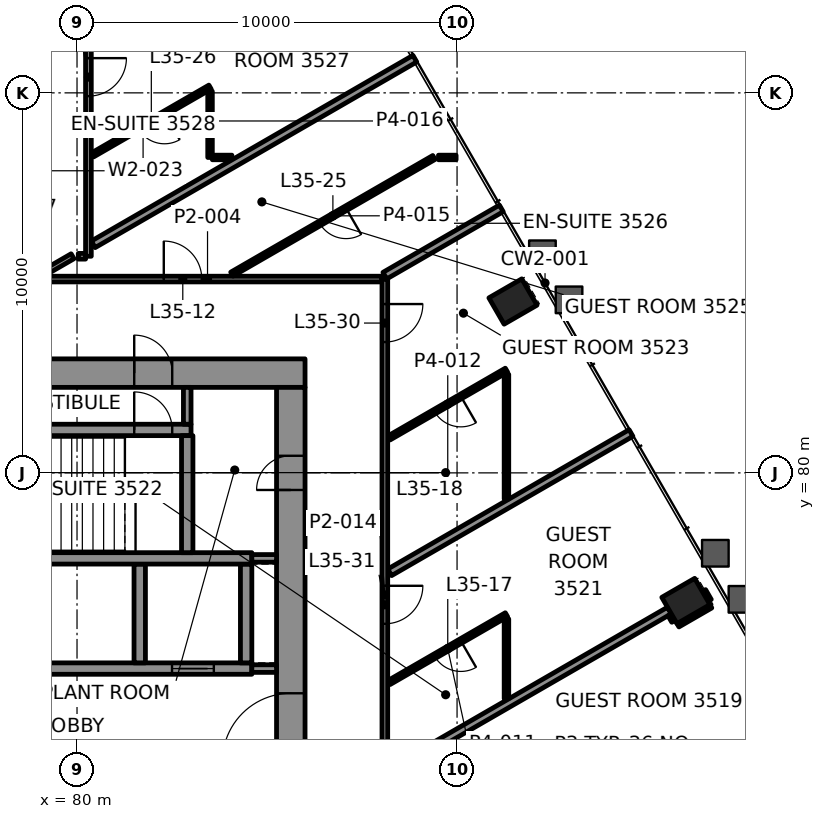
"""IFC4 building model, lengths in metres.
Left out: names, types, materials, properties, quantities, classifications, styles, units other than length and angle.
Written with IfcOpenShell. Run it as: python <this file> out.ifc"""

import sys

from ifc_helpers import new_model, si_unit, direction, frame, frame_2d, origin, origin_2d, place, context, subcontext, project, spatial, rectangle, hollow_rectangle, extrude, element, fill, save


model = new_model("IFC4")
c1 = context("Model", 3, precision=1e-05, world=origin(), true_north=direction((0.0, 1.0)))
c2 = subcontext(c1, "Body", "Model", "MODEL_VIEW")
j1 = project(units=[si_unit("LENGTHUNIT", "METRE"), si_unit("PLANEANGLEUNIT", "RADIAN")], contexts=[c1])
p1 = place(None, origin())
s1 = spatial("IfcSite", under=j1, at=p1, CompositionType="ELEMENT")
p2 = place(p1, origin())
s2 = spatial("IfcBuilding", under=s1, at=p2, CompositionType="ELEMENT")
p3 = place(p2, frame((0.0, 0.0, 155.8)))
s3 = spatial("IfcBuildingStorey", under=s2, at=p3, CompositionType="ELEMENT", Elevation=155.8)
for number, where, z_axis, x_axis in (
    (1, (96.021, 76.628, -0.0), (0.0, 0.0, 1.0), (-0.5, 0.866, 0.0)),
    (2, (91.47, 84.509, -0.0), (0.0, 0.0, 1.0), (-0.5, 0.866, 0.0)),
):
    element("IfcColumn", number, at=place(p3, frame(where, z_axis=z_axis, x_axis=x_axis)), inside=s3, PredefinedType="COLUMN", context=c2, shape_type="SweptSolid", body=[
        extrude(hollow_rectangle(XDim=0.8, YDim=1.0, WallThickness=0.05, at=origin_2d()), origin(), (0.0, 0.0, 1.0), 3.9),
    ])
p4 = place(p3, frame((64.0, 82.625, 0.0), z_axis=(0.0, 0.0, 1.0), x_axis=(1.0, 0.0, 0.0)))
e3 = element("IfcWall", 3, at=p4, inside=s3, PredefinedType="SHEAR", context=c2, shape_type="SweptSolid", body=[
    extrude(rectangle(XDim=22.0, YDim=0.75, at=frame_2d((11.0, 0.0))), origin(), (0.0, 0.0, 1.0), 3.7),
])
p5 = place(p4, frame((3.695, 0.0, 0.0)))
e4 = element("IfcOpeningElement", 4, at=p5, cuts=e3, PredefinedType="OPENING", context=c2, shape_type="SweptSolid", body=[
    extrude(rectangle(XDim=1.0, YDim=2.1, at=frame_2d((0.5, 1.05))), frame((0.0, 0.385, 0.0), z_axis=(0.0, -1.0, 0.0), x_axis=(1.0, 0.0, 0.0)), (0.0, 0.0, 1.0), 0.77),
])
p6 = place(p4, frame((17.505, 0.0, 0.0)))
e5 = element("IfcOpeningElement", 5, at=p6, cuts=e3, PredefinedType="OPENING", context=c2, shape_type="SweptSolid", body=[
    extrude(rectangle(XDim=1.0, YDim=2.1, at=frame_2d((0.5, 1.05))), frame((0.0, 0.385, 0.0), z_axis=(0.0, -1.0, 0.0), x_axis=(1.0, 0.0, 0.0)), (0.0, 0.0, 1.0), 0.77),
])
p7 = place(p4, frame((10.65, 0.0, 0.0)))
e6 = element("IfcOpeningElement", 6, at=p7, cuts=e3, PredefinedType="OPENING", context=c2, shape_type="SweptSolid", body=[
    extrude(rectangle(XDim=0.9, YDim=2.1, at=frame_2d((0.45, 1.05))), frame((0.0, 0.385, 0.0), z_axis=(0.0, -1.0, 0.0), x_axis=(1.0, 0.0, 0.0)), (0.0, 0.0, 1.0), 0.77),
])
p8 = place(p3, frame((85.625, 67.75, 0.0), z_axis=(0.0, 0.0, 1.0), x_axis=(0.0, 1.0, 0.0)))
e7 = element("IfcWall", 7, at=p8, inside=s3, PredefinedType="SHEAR", context=c2, shape_type="SweptSolid", body=[
    extrude(rectangle(XDim=14.5, YDim=0.75, at=frame_2d((7.25, 0.0))), origin(), (0.0, 0.0, 1.0), 3.7),
])
p9 = place(p8, frame((4.65, 0.0, 0.0)))
e8 = element("IfcOpeningElement", 8, at=p9, cuts=e7, PredefinedType="OPENING", context=c2, shape_type="SweptSolid", body=[
    extrude(rectangle(XDim=1.8, YDim=2.1, at=frame_2d((0.9, 1.05))), frame((0.0, 0.385, 0.0), z_axis=(0.0, -1.0, 0.0), x_axis=(1.0, 0.0, 0.0)), (0.0, 0.0, 1.0), 0.77),
])
p10 = place(p8, frame((11.8, 0.0, 0.0)))
e9 = element("IfcOpeningElement", 9, at=p10, cuts=e7, PredefinedType="OPENING", context=c2, shape_type="SweptSolid", body=[
    extrude(rectangle(XDim=0.9, YDim=2.1, at=frame_2d((0.45, 1.05))), frame((0.0, 0.385, 0.0), z_axis=(0.0, -1.0, 0.0), x_axis=(1.0, 0.0, 0.0)), (0.0, 0.0, 1.0), 0.77),
])
p11 = place(p3, frame((70.3, 74.85, 0.0), z_axis=(0.0, 0.0, 1.0), x_axis=(1.0, 0.0, 0.0)))
e10 = element("IfcWall", 10, at=p11, inside=s3, PredefinedType="SHEAR", context=c2, shape_type="SweptSolid", body=[
    extrude(rectangle(XDim=14.3, YDim=0.3, at=frame_2d((7.15, 0.0))), origin(), (0.0, 0.0, 1.0), 3.7),
])
p12 = place(p11, frame((3.8, 0.0, 0.0)))
e11 = element("IfcOpeningElement", 11, at=p12, cuts=e10, PredefinedType="OPENING", context=c2, shape_type="SweptSolid", body=[
    extrude(rectangle(XDim=1.1, YDim=2.1, at=frame_2d((0.55, 1.05))), frame((0.0, 0.16, 0.0), z_axis=(0.0, -1.0, 0.0), x_axis=(1.0, 0.0, 0.0)), (0.0, 0.0, 1.0), 0.32),
])
p13 = place(p11, frame((12.2, 0.0, 0.0)))
e12 = element("IfcOpeningElement", 12, at=p13, cuts=e10, PredefinedType="OPENING", context=c2, shape_type="SweptSolid", body=[
    extrude(rectangle(XDim=1.1, YDim=2.1, at=frame_2d((0.55, 1.05))), frame((0.0, 0.16, 0.0), z_axis=(0.0, -1.0, 0.0), x_axis=(1.0, 0.0, 0.0)), (0.0, 0.0, 1.0), 0.32),
])
for number, where, z_axis, x_axis in (
    (13, (81.65, 75.0, 0.0), (0.0, 0.0, 1.0), (0.0, 1.0, 0.0)),
    (14, (84.45, 75.0, 0.0), (0.0, 0.0, 1.0), (0.0, 1.0, 0.0)),
):
    element("IfcWall", number, at=place(p3, frame(where, z_axis=z_axis, x_axis=x_axis)), inside=s3, PredefinedType="SHEAR", context=c2, shape_type="SweptSolid", body=[
        extrude(rectangle(XDim=2.6, YDim=0.3, at=frame_2d((1.3, 0.0))), origin(), (0.0, 0.0, 1.0), 3.7),
    ])
p14 = place(p3, frame((67.15, 77.75, 0.0), z_axis=(0.0, 0.0, 1.0), x_axis=(1.0, 0.0, 0.0)))
e15 = element("IfcWall", 15, at=p14, inside=s3, PredefinedType="SHEAR", context=c2, shape_type="SweptSolid", body=[
    extrude(rectangle(XDim=17.45, YDim=0.3, at=frame_2d((8.725, 0.0))), origin(), (0.0, 0.0, 1.0), 3.7),
])
p15 = place(p14, frame((0.545, 0.0, 0.0)))
e16 = element("IfcOpeningElement", 16, at=p15, cuts=e15, PredefinedType="OPENING", context=c2, shape_type="SweptSolid", body=[
    extrude(rectangle(XDim=1.0, YDim=2.1, at=frame_2d((0.5, 1.05))), frame((0.0, 0.16, 0.0), z_axis=(0.0, -1.0, 0.0), x_axis=(1.0, 0.0, 0.0)), (0.0, 0.0, 1.0), 0.32),
])
p16 = place(p3, frame((76.14, 81.13, 0.0), z_axis=(0.0, 0.0, 1.0), x_axis=(1.0, 0.0, 0.0)))
e17 = element("IfcWall", 17, at=p16, inside=s3, PredefinedType="SHEAR", context=c2, shape_type="SweptSolid", body=[
    extrude(rectangle(XDim=6.86, YDim=0.3, at=frame_2d((3.43, 0.0))), origin(), (0.0, 0.0, 1.0), 3.7),
])
p17 = place(p16, frame((5.365, 0.0, 0.0)))
e18 = element("IfcOpeningElement", 18, at=p17, cuts=e17, PredefinedType="OPENING", context=c2, shape_type="SweptSolid", body=[
    extrude(rectangle(XDim=1.0, YDim=2.1, at=frame_2d((0.5, 1.05))), frame((0.0, 0.16, 0.0), z_axis=(0.0, -1.0, 0.0), x_axis=(1.0, 0.0, 0.0)), (0.0, 0.0, 1.0), 0.32),
])
p18 = place(p3, frame((82.9, 77.9, 0.0), z_axis=(0.0, 0.0, 1.0), x_axis=(0.0, 1.0, 0.0)))
e19 = element("IfcWall", 19, at=p18, inside=s3, PredefinedType="SHEAR", context=c2, shape_type="SweptSolid", body=[
    extrude(rectangle(XDim=3.08, YDim=0.3, at=frame_2d((1.54, 0.0))), origin(), (0.0, 0.0, 1.0), 3.7),
])
p19 = place(p3, frame((78.844, 85.1, 0.0), z_axis=(0.0, 0.0, 1.0), x_axis=(1.0, 0.0, 0.0)))
e20 = element("IfcWall", 20, at=p19, inside=s3, PredefinedType="PARTITIONING", context=c2, shape_type="SweptSolid", body=[
    extrude(rectangle(XDim=9.181, YDim=0.15, at=frame_2d((4.59, 0.0))), origin(), (0.0, 0.0, 1.0), 3.1),
])
p20 = place(p19, frame((3.439, 0.0, 0.0)))
e21 = element("IfcOpeningElement", 21, at=p20, cuts=e20, PredefinedType="OPENING", context=c2, shape_type="SweptSolid", body=[
    extrude(rectangle(XDim=1.0, YDim=2.1, at=frame_2d((0.5, 1.05))), frame((0.0, 0.085, 0.0), z_axis=(0.0, -1.0, 0.0), x_axis=(1.0, 0.0, 0.0)), (0.0, 0.0, 1.0), 0.17),
])
p21 = place(p3, frame((80.033, 85.7, 0.0), z_axis=(0.0, 0.0, 1.0), x_axis=(1.0, 0.0, 0.0)))
e22 = element("IfcWall", 22, at=p21, inside=s3, PredefinedType="PARTITIONING", context=c2, shape_type="SweptSolid", body=[
    extrude(rectangle(XDim=0.192, YDim=0.15, at=frame_2d((0.096, 0.0))), origin(), (0.0, 0.0, 1.0), 3.1),
])
p22 = place(p3, frame((83.56, 88.3, 0.0), z_axis=(0.0, 0.0, 1.0), x_axis=(1.0, 0.0, 0.0)))
e23 = element("IfcWall", 23, at=p22, inside=s3, PredefinedType="PARTITIONING", context=c2, shape_type="SweptSolid", body=[
    extrude(rectangle(XDim=0.516, YDim=0.12, at=frame_2d((0.258, 0.0))), origin(), (0.0, 0.0, 1.0), 3.1),
])
p23 = place(p3, frame((89.511, 88.3, 0.0), z_axis=(0.0, 0.0, 1.0), x_axis=(1.0, 0.0, 0.0)))
e24 = element("IfcWall", 24, at=p23, inside=s3, PredefinedType="PARTITIONING", context=c2, shape_type="SweptSolid", body=[
    extrude(rectangle(XDim=0.464, YDim=0.12, at=frame_2d((0.232, 0.0))), origin(), (0.0, 0.0, 1.0), 3.1),
])
p24 = place(p3, frame((89.677, 67.712, 0.0), z_axis=(0.0, 0.0, 1.0), x_axis=(0.866020529357, 0.500008442661, 0.0)))
e25 = element("IfcWall", 25, at=p24, inside=s3, PredefinedType="PARTITIONING", context=c2, shape_type="SweptSolid", body=[
    extrude(rectangle(XDim=10.912, YDim=0.2, at=frame_2d((5.456, 0.0))), origin(), (0.0, 0.0, 1.0), 2.865),
])
p25 = place(p3, frame((95.788, 76.032, 0.0), z_axis=(0.0, 0.0, 1.0), x_axis=(0.866039090965, 0.499976292358, 0.0)))
e26 = element("IfcWall", 26, at=p25, inside=s3, PredefinedType="PARTITIONING", context=c2, shape_type="SweptSolid", body=[
    extrude(rectangle(XDim=0.999, YDim=0.2, at=frame_2d((0.5, 0.0))), origin(), (0.0, 0.0, 1.0), 2.865),
])
p26 = place(p3, frame((88.227, 72.129, 0.0), z_axis=(0.0, 0.0, 1.0), x_axis=(0.866037293988, 0.499979404997, 0.0)))
e27 = element("IfcWall", 27, at=p26, inside=s3, PredefinedType="PARTITIONING", context=c2, shape_type="SweptSolid", body=[
    extrude(rectangle(XDim=8.499, YDim=0.2, at=frame_2d((4.25, 0.0))), origin(), (0.0, 0.0, 1.0), 3.1),
])
p27 = place(p3, frame((91.3, 76.267, 0.0), z_axis=(0.0, 0.0, 1.0), x_axis=(-0.866028357664, -0.499994883695, 0.0)))
e28 = element("IfcWall", 28, at=p27, inside=s3, PredefinedType="PARTITIONING", context=c2, shape_type="SweptSolid", body=[
    extrude(rectangle(XDim=3.568, YDim=0.12, at=frame_2d((1.784, 0.0))), origin(), (0.0, 0.0, 1.0), 3.1),
])
p28 = place(p27, frame((1.384, 0.0, 0.0)))
e29 = element("IfcOpeningElement", 29, at=p28, cuts=e28, PredefinedType="OPENING", context=c2, shape_type="SweptSolid", body=[
    extrude(rectangle(XDim=0.8, YDim=2.1, at=frame_2d((0.4, 1.05))), frame((0.0, 0.07, 0.0), z_axis=(0.0, -1.0, 0.0), x_axis=(1.0, 0.0, 0.0)), (0.0, 0.0, 1.0), 0.14),
])
p29 = place(p3, frame((88.227, 77.383, 0.0), z_axis=(0.0, 0.0, 1.0), x_axis=(0.866023680911, 0.500002984092, 0.0)))
e30 = element("IfcWall", 30, at=p29, inside=s3, PredefinedType="PARTITIONING", context=c2, shape_type="SweptSolid", body=[
    extrude(rectangle(XDim=7.333, YDim=0.2, at=frame_2d((3.666, 0.0))), origin(), (0.0, 0.0, 1.0), 2.865),
])
p30 = place(p3, frame((91.3, 82.703, 0.0), z_axis=(0.0, 0.0, 1.0), x_axis=(-0.866028357664, -0.499994883695, 0.0)))
e31 = element("IfcWall", 31, at=p30, inside=s3, PredefinedType="PARTITIONING", context=c2, shape_type="SweptSolid", body=[
    extrude(rectangle(XDim=3.568, YDim=0.12, at=frame_2d((1.784, 0.0))), origin(), (0.0, 0.0, 1.0), 3.1),
])
p31 = place(p30, frame((1.384, 0.0, 0.0)))
e32 = element("IfcOpeningElement", 32, at=p31, cuts=e31, PredefinedType="OPENING", context=c2, shape_type="SweptSolid", body=[
    extrude(rectangle(XDim=0.8, YDim=2.1, at=frame_2d((0.4, 1.05))), frame((0.0, 0.07, 0.0), z_axis=(0.0, -1.0, 0.0), x_axis=(1.0, 0.0, 0.0)), (0.0, 0.0, 1.0), 0.14),
])
p32 = place(p3, frame((88.1, 85.19, 0.0), z_axis=(0.0, 0.0, 1.0), x_axis=(0.866039681005, 0.499975270313, 0.0)))
e33 = element("IfcWall", 33, at=p32, inside=s3, PredefinedType="PARTITIONING", context=c2, shape_type="SweptSolid", body=[
    extrude(rectangle(XDim=3.539, YDim=0.2, at=frame_2d((1.77, 0.0))), origin(), (0.0, 0.0, 1.0), 2.865),
])
p33 = place(p3, frame((89.391, 88.3, 0.0), z_axis=(0.0, 0.0, 1.0), x_axis=(-0.866037264291, -0.499979456437, 0.0)))
e34 = element("IfcWall", 34, at=p33, inside=s3, PredefinedType="PARTITIONING", context=c2, shape_type="SweptSolid", body=[
    extrude(rectangle(XDim=6.14, YDim=0.12, at=frame_2d((3.07, 0.0))), origin(), (0.0, 0.0, 1.0), 2.865),
])
p34 = place(p33, frame((2.67, 0.0, 0.0)))
e35 = element("IfcOpeningElement", 35, at=p34, cuts=e34, PredefinedType="OPENING", context=c2, shape_type="SweptSolid", body=[
    extrude(rectangle(XDim=0.8, YDim=2.1, at=frame_2d((0.4, 1.05))), frame((0.0, 0.07, 0.0), z_axis=(0.0, -1.0, 0.0), x_axis=(1.0, 0.0, 0.0)), (0.0, 0.0, 1.0), 0.14),
])
p35 = place(p3, frame((79.086, 85.24, 0.0), z_axis=(0.0, 0.0, 1.0), x_axis=(0.865898279276, 0.500220121494, 0.0)))
e36 = element("IfcWall", 36, at=p35, inside=s3, PredefinedType="PARTITIONING", context=c2, shape_type="SweptSolid", body=[
    extrude(rectangle(XDim=0.92, YDim=0.15, at=frame_2d((0.46, 0.0))), origin(), (0.0, 0.0, 1.0), 3.1),
])
p36 = place(p3, frame((80.427, 86.014, 0.0), z_axis=(0.0, 0.0, 1.0), x_axis=(0.866026648273, 0.499997844476, 0.0)))
e37 = element("IfcWall", 37, at=p36, inside=s3, PredefinedType="PARTITIONING", context=c2, shape_type="SweptSolid", body=[
    extrude(rectangle(XDim=9.771, YDim=0.2, at=frame_2d((4.886, 0.0))), origin(), (0.0, 0.0, 1.0), 2.865),
])
p37 = place(p3, frame((83.5, 90.152, 0.0), z_axis=(0.0, 0.0, 1.0), x_axis=(-0.866028357664, -0.499994883695, 0.0)))
e38 = element("IfcWall", 38, at=p37, inside=s3, PredefinedType="PARTITIONING", context=c2, shape_type="SweptSolid", body=[
    extrude(rectangle(XDim=3.568, YDim=0.12, at=frame_2d((1.784, 0.0))), origin(), (0.0, 0.0, 1.0), 3.1),
])
p38 = place(p37, frame((1.384, 0.0, 0.0)))
e39 = element("IfcOpeningElement", 39, at=p38, cuts=e38, PredefinedType="OPENING", context=c2, shape_type="SweptSolid", body=[
    extrude(rectangle(XDim=0.8, YDim=2.1, at=frame_2d((0.4, 1.05))), frame((0.0, 0.07, 0.0), z_axis=(0.0, -1.0, 0.0), x_axis=(1.0, 0.0, 0.0)), (0.0, 0.0, 1.0), 0.14),
])
p39 = place(p3, frame((91.3, 74.059, 0.0), z_axis=(0.0, 0.0, 1.0), x_axis=(0.0, 1.0, 0.0)))
e40 = element("IfcWall", 40, at=p39, inside=s3, PredefinedType="PARTITIONING", context=c2, shape_type="SweptSolid", body=[
    extrude(rectangle(XDim=2.099, YDim=0.12, at=frame_2d((1.05, 0.0))), origin(), (0.0, 0.0, 1.0), 3.1),
])
p40 = place(p3, frame((91.3, 79.312, 0.0), z_axis=(0.0, 0.0, 1.0), x_axis=(0.0, 1.0, 0.0)))
e41 = element("IfcWall", 41, at=p40, inside=s3, PredefinedType="PARTITIONING", context=c2, shape_type="SweptSolid", body=[
    extrude(rectangle(XDim=3.281, YDim=0.12, at=frame_2d((1.641, 0.0))), origin(), (0.0, 0.0, 1.0), 3.1),
])
p41 = place(p3, frame((88.1, 85.1, 0.0), z_axis=(0.0, 0.0, 1.0), x_axis=(0.0, -1.0, 0.0)))
e42 = element("IfcWall", 42, at=p41, inside=s3, PredefinedType="PARTITIONING", context=c2, shape_type="SweptSolid", body=[
    extrude(rectangle(XDim=16.624, YDim=0.15, at=frame_2d((8.312, 0.0))), origin(), (0.0, 0.0, 1.0), 3.1),
])
p42 = place(p41, frame((0.657, 0.0, 0.0)))
e43 = element("IfcOpeningElement", 43, at=p42, cuts=e42, PredefinedType="OPENING", context=c2, shape_type="SweptSolid", body=[
    extrude(rectangle(XDim=1.0, YDim=2.1, at=frame_2d((0.5, 1.05))), frame((0.0, 0.085, 0.0), z_axis=(0.0, -1.0, 0.0), x_axis=(1.0, 0.0, 0.0)), (0.0, 0.0, 1.0), 0.17),
])
p43 = place(p41, frame((8.071, 0.0, 0.0)))
e44 = element("IfcOpeningElement", 44, at=p43, cuts=e42, PredefinedType="OPENING", context=c2, shape_type="SweptSolid", body=[
    extrude(rectangle(XDim=1.0, YDim=2.1, at=frame_2d((0.5, 1.05))), frame((0.0, 0.085, 0.0), z_axis=(0.0, -1.0, 0.0), x_axis=(1.0, 0.0, 0.0)), (0.0, 0.0, 1.0), 0.17),
])
p44 = place(p41, frame((13.325, 0.0, 0.0)))
e45 = element("IfcOpeningElement", 45, at=p44, cuts=e42, PredefinedType="OPENING", context=c2, shape_type="SweptSolid", body=[
    extrude(rectangle(XDim=1.0, YDim=2.1, at=frame_2d((0.5, 1.05))), frame((0.0, 0.085, 0.0), z_axis=(0.0, -1.0, 0.0), x_axis=(1.0, 0.0, 0.0)), (0.0, 0.0, 1.0), 0.17),
])
p45 = place(p3, frame((83.5, 88.3, 0.0), z_axis=(0.0, 0.0, 1.0), x_axis=(0.0, 1.0, 0.0)))
e46 = element("IfcWall", 46, at=p45, inside=s3, PredefinedType="PARTITIONING", context=c2, shape_type="SweptSolid", body=[
    extrude(rectangle(XDim=1.743, YDim=0.12, at=frame_2d((0.872, 0.0))), origin(), (0.0, 0.0, 1.0), 3.1),
])
p46 = place(p3, frame((80.3, 96.699, 0.0), z_axis=(0.0, 0.0, 1.0), x_axis=(0.0, -1.0, 0.0)))
e47 = element("IfcWall", 47, at=p46, inside=s3, PredefinedType="PARTITIONING", context=c2, shape_type="SweptSolid", body=[
    extrude(rectangle(XDim=11.0, YDim=0.15, at=frame_2d((5.5, 0.0))), origin(), (0.0, 0.0, 1.0), 3.022),
])
p47 = place(p46, frame((5.786, 0.0, 0.0)))
e48 = element("IfcOpeningElement", 48, at=p47, cuts=e47, PredefinedType="OPENING", context=c2, shape_type="SweptSolid", body=[
    extrude(rectangle(XDim=1.0, YDim=2.1, at=frame_2d((0.5, 1.05))), frame((0.0, 0.085, 0.0), z_axis=(0.0, -1.0, 0.0), x_axis=(1.0, 0.0, 0.0)), (0.0, 0.0, 1.0), 0.17),
])
p48 = place(p3, frame((96.603, 76.619, 0.0), z_axis=(0.0, 0.0, 1.0), x_axis=(-0.500617711777, 0.865668473872, 0.0)))
e49 = element("IfcWall", 49, at=p48, inside=s3, PredefinedType="PARTITIONING", context=c2, shape_type="SweptSolid", body=[
    extrude(rectangle(XDim=0.299, YDim=0.2, at=frame_2d((0.149, 0.0))), origin(), (0.0, 0.0, 1.0), 3.1),
])
p49 = place(p3, frame((95.737, 76.119, 0.0), z_axis=(0.0, 0.0, 1.0), x_axis=(-0.499439139722, 0.866348974555, 0.0)))
e50 = element("IfcWall", 50, at=p49, inside=s3, PredefinedType="PARTITIONING", context=c2, shape_type="SweptSolid", body=[
    extrude(rectangle(XDim=0.199, YDim=0.2, at=frame_2d((0.1, 0.0))), origin(), (0.0, 0.0, 1.0), 3.1),
])
for number, where, z_axis, x_axis in (
    (51, (84.6, 74.85, 0.0), (0.0, 0.0, 1.0), (1.0, 0.0, 0.0)),
    (52, (84.6, 77.75, 0.0), (0.0, 0.0, 1.0), (1.0, 0.0, 0.0)),
):
    element("IfcWall", number, at=place(p3, frame(where, z_axis=z_axis, x_axis=x_axis)), inside=s3, PredefinedType="PARTITIONING", context=c2, shape_type="SweptSolid", body=[
        extrude(rectangle(XDim=0.65, YDim=0.2, at=frame_2d((0.325, 0.0))), origin(), (0.0, 0.0, 1.0), 3.7),
    ])
p50 = place(p3, frame((82.9, 81.28, 0.0), z_axis=(0.0, 0.0, 1.0), x_axis=(0.0, 1.0, 0.0)))
e53 = element("IfcWall", 53, at=p50, inside=s3, PredefinedType="PARTITIONING", context=c2, shape_type="SweptSolid", body=[
    extrude(rectangle(XDim=0.97, YDim=0.2, at=frame_2d((0.485, 0.0))), origin(), (0.0, 0.0, 1.0), 3.7),
])
p51 = place(p20, origin())
e54 = element("IfcDoor", 54, at=p51, inside=s3, OperationType="SINGLE_SWING_RIGHT", PredefinedType="DOOR", context=c2, shape_type="SweptSolid", body=[
    extrude(rectangle(XDim=1.0, YDim=2.1, at=frame_2d((0.5, 1.05))), frame((0.0, 0.025, 0.0), z_axis=(0.0, -1.0, 0.0), x_axis=(1.0, 0.0, 0.0)), (0.0, 0.0, 1.0), 0.05),
])
fill(e21, e54)
p52 = place(p28, origin())
e55 = element("IfcDoor", 55, at=p52, inside=s3, OperationType="SINGLE_SWING_RIGHT", PredefinedType="DOOR", context=c2, shape_type="SweptSolid", body=[
    extrude(rectangle(XDim=0.8, YDim=2.1, at=frame_2d((0.4, 1.05))), frame((0.0, 0.025, 0.0), z_axis=(0.0, -1.0, 0.0), x_axis=(1.0, 0.0, 0.0)), (0.0, 0.0, 1.0), 0.05),
])
fill(e29, e55)
p53 = place(p31, origin())
e56 = element("IfcDoor", 56, at=p53, inside=s3, OperationType="SINGLE_SWING_RIGHT", PredefinedType="DOOR", context=c2, shape_type="SweptSolid", body=[
    extrude(rectangle(XDim=0.8, YDim=2.1, at=frame_2d((0.4, 1.05))), frame((0.0, 0.025, 0.0), z_axis=(0.0, -1.0, 0.0), x_axis=(1.0, 0.0, 0.0)), (0.0, 0.0, 1.0), 0.05),
])
fill(e32, e56)
p54 = place(p34, origin())
e57 = element("IfcDoor", 57, at=p54, inside=s3, OperationType="SINGLE_SWING_RIGHT", PredefinedType="DOOR", context=c2, shape_type="SweptSolid", body=[
    extrude(rectangle(XDim=0.8, YDim=2.1, at=frame_2d((0.4, 1.05))), frame((0.0, 0.025, 0.0), z_axis=(0.0, -1.0, 0.0), x_axis=(1.0, 0.0, 0.0)), (0.0, 0.0, 1.0), 0.05),
])
fill(e35, e57)
p55 = place(p38, origin())
e58 = element("IfcDoor", 58, at=p55, inside=s3, OperationType="SINGLE_SWING_RIGHT", PredefinedType="DOOR", context=c2, shape_type="SweptSolid", body=[
    extrude(rectangle(XDim=0.8, YDim=2.1, at=frame_2d((0.4, 1.05))), frame((0.0, 0.025, 0.0), z_axis=(0.0, -1.0, 0.0), x_axis=(1.0, 0.0, 0.0)), (0.0, 0.0, 1.0), 0.05),
])
fill(e39, e58)
p56 = place(p42, origin())
e59 = element("IfcDoor", 59, at=p56, inside=s3, OperationType="SINGLE_SWING_LEFT", PredefinedType="DOOR", context=c2, shape_type="SweptSolid", body=[
    extrude(rectangle(XDim=1.0, YDim=2.1, at=frame_2d((0.5, 1.05))), frame((0.0, 0.025, 0.0), z_axis=(0.0, -1.0, 0.0), x_axis=(1.0, 0.0, 0.0)), (0.0, 0.0, 1.0), 0.05),
])
fill(e43, e59)
p57 = place(p43, origin())
e60 = element("IfcDoor", 60, at=p57, inside=s3, OperationType="SINGLE_SWING_LEFT", PredefinedType="DOOR", context=c2, shape_type="SweptSolid", body=[
    extrude(rectangle(XDim=1.0, YDim=2.1, at=frame_2d((0.5, 1.05))), frame((0.0, 0.025, 0.0), z_axis=(0.0, -1.0, 0.0), x_axis=(1.0, 0.0, 0.0)), (0.0, 0.0, 1.0), 0.05),
])
fill(e44, e60)
p58 = place(p47, origin())
e61 = element("IfcDoor", 61, at=p58, inside=s3, OperationType="SINGLE_SWING_LEFT", PredefinedType="DOOR", context=c2, shape_type="SweptSolid", body=[
    extrude(rectangle(XDim=1.0, YDim=2.1, at=frame_2d((0.5, 1.05))), frame((0.0, 0.025, 0.0), z_axis=(0.0, -1.0, 0.0), x_axis=(1.0, 0.0, 0.0)), (0.0, 0.0, 1.0), 0.05),
])
fill(e48, e61)
p59 = place(p13, origin())
e62 = element("IfcDoor", 62, at=p59, inside=s3, OperationType="DOUBLE_DOOR_SLIDING", PredefinedType="DOOR", context=c2, shape_type="SweptSolid", body=[
    extrude(rectangle(XDim=1.1, YDim=2.1, at=frame_2d((0.55, 1.05))), frame((0.0, 0.025, 0.0), z_axis=(0.0, -1.0, 0.0), x_axis=(1.0, 0.0, 0.0)), (0.0, 0.0, 1.0), 0.05),
])
fill(e12, e62)
p60 = place(p17, origin())
e63 = element("IfcDoor", 63, at=p60, inside=s3, OperationType="SINGLE_SWING_RIGHT", PredefinedType="DOOR", context=c2, shape_type="SweptSolid", body=[
    extrude(rectangle(XDim=1.0, YDim=2.1, at=frame_2d((0.5, 1.05))), frame((0.0, 0.025, 0.0), z_axis=(0.0, -1.0, 0.0), x_axis=(1.0, 0.0, 0.0)), (0.0, 0.0, 1.0), 0.05),
])
fill(e18, e63)
p61 = place(p6, origin())
e64 = element("IfcDoor", 64, at=p61, inside=s3, OperationType="SINGLE_SWING_LEFT", PredefinedType="DOOR", context=c2, shape_type="SweptSolid", body=[
    extrude(rectangle(XDim=1.0, YDim=2.1, at=frame_2d((0.5, 1.05))), frame((0.0, 0.095, 0.0), z_axis=(0.0, -1.0, 0.0), x_axis=(1.0, 0.0, 0.0)), (0.0, 0.0, 1.0), 0.19),
])
fill(e5, e64)
p62 = place(p9, origin())
e65 = element("IfcDoor", 65, at=p62, inside=s3, OperationType="SINGLE_SWING_RIGHT", PredefinedType="DOOR", context=c2, shape_type="SweptSolid", body=[
    extrude(rectangle(XDim=1.8, YDim=2.1, at=frame_2d((0.9, 1.05))), frame((0.0, 0.095, 0.0), z_axis=(0.0, -1.0, 0.0), x_axis=(1.0, 0.0, 0.0)), (0.0, 0.0, 1.0), 0.19),
])
fill(e8, e65)
p63 = place(p10, origin())
e66 = element("IfcDoor", 66, at=p63, inside=s3, OperationType="SINGLE_SWING_LEFT", PredefinedType="DOOR", context=c2, shape_type="SweptSolid", body=[
    extrude(rectangle(XDim=0.9, YDim=2.1, at=frame_2d((0.45, 1.05))), frame((0.0, 0.095, 0.0), z_axis=(0.0, -1.0, 0.0), x_axis=(1.0, 0.0, 0.0)), (0.0, 0.0, 1.0), 0.19),
])
fill(e9, e66)
save(model, sys.argv[1])
